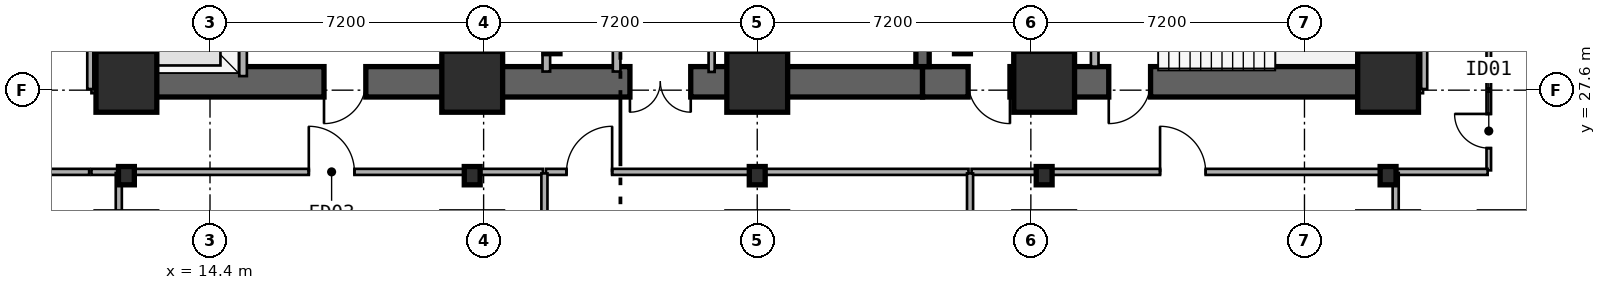
"""IFC4 building model, lengths in metres.
Left out: names, types, materials, properties, quantities, classifications, styles, units other than length and angle.
Written with IfcOpenShell. Run it as: python <this file> out.ifc"""

import sys

from ifc_helpers import new_model, si_unit, direction, frame, frame_2d, origin, origin_2d, place, context, subcontext, project, spatial, rectangle, i_section, extrude, element, fill, save


model = new_model("IFC4")
c1 = context("Model", 3, precision=1e-05, world=origin(), true_north=direction((0.0, 1.0)))
c2 = subcontext(c1, "Body", "Model", "MODEL_VIEW")
j1 = project(units=[si_unit("LENGTHUNIT", "METRE"), si_unit("PLANEANGLEUNIT", "RADIAN")], contexts=[c1])
p1 = place(None, origin())
s1 = spatial("IfcSite", under=j1, at=p1, CompositionType="ELEMENT")
p2 = place(p1, origin())
s2 = spatial("IfcBuilding", under=s1, at=p2, CompositionType="ELEMENT")
p3 = place(p2, frame((0.0, 0.0, -13.2)))
s3 = spatial("IfcBuildingStorey", under=s2, at=p3, CompositionType="ELEMENT", Elevation=-13.2)
p4 = place(p3, frame((21.18, 27.82, 0.0), z_axis=(0.0, 0.0, 1.0), x_axis=(-1.0, 0.0, 0.0)))
e1 = element("IfcWall", 1, at=p4, inside=s3, PredefinedType="SHEAR", context=c2, shape_type="SweptSolid", body=[
    extrude(rectangle(XDim=9.03, YDim=0.8, at=frame_2d((4.515, 0.0))), origin(), (0.0, 0.0, 1.0), 4.4),
])
p5 = place(p4, frame((2.68, 0.0, 0.0)))
e2 = element("IfcOpeningElement", 2, at=p5, cuts=e1, PredefinedType="OPENING", context=c2, shape_type="SweptSolid", body=[
    extrude(rectangle(XDim=1.1, YDim=2.15, at=frame_2d((0.55, 1.075))), frame((0.0, 0.41, 0.0), z_axis=(0.0, -1.0, 0.0), x_axis=(1.0, 0.0, 0.0)), (0.0, 0.0, 1.0), 0.82),
])
p6 = place(p3, frame((33.15, 27.82, 0.0), z_axis=(0.0, 0.0, 1.0), x_axis=(-1.0, 0.0, 0.0)))
e3 = element("IfcWall", 3, at=p6, inside=s3, PredefinedType="SHEAR", context=c2, shape_type="SweptSolid", body=[
    extrude(rectangle(XDim=11.97, YDim=0.8, at=frame_2d((5.985, 0.0))), origin(), (0.0, 0.0, 1.0), 4.4),
])
p7 = place(p6, frame((6.1, 0.0, 0.0)))
e4 = element("IfcOpeningElement", 4, at=p7, cuts=e3, PredefinedType="OPENING", context=c2, shape_type="SweptSolid", body=[
    extrude(rectangle(XDim=1.6, YDim=2.2, at=frame_2d((0.8, 1.1))), frame((0.0, 0.41, 0.0), z_axis=(0.0, -1.0, 0.0), x_axis=(1.0, 0.0, 0.0)), (0.0, 0.0, 1.0), 0.82),
])
p8 = place(p3, frame((45.38, 27.82, 0.0), z_axis=(0.0, 0.0, 1.0), x_axis=(-1.0, 0.0, 0.0)))
e5 = element("IfcWall", 5, at=p8, inside=s3, PredefinedType="SHEAR", context=c2, shape_type="SweptSolid", body=[
    extrude(rectangle(XDim=12.23, YDim=0.8, at=frame_2d((6.115, 0.0))), origin(), (0.0, 0.0, 1.0), 4.4),
])
p9 = place(p8, frame((9.93, 0.0, 0.0)))
e6 = element("IfcOpeningElement", 6, at=p9, cuts=e5, PredefinedType="OPENING", context=c2, shape_type="SweptSolid", body=[
    extrude(rectangle(XDim=1.1, YDim=2.15, at=frame_2d((0.55, 1.075))), frame((0.0, 0.41, 0.0), z_axis=(0.0, -1.0, 0.0), x_axis=(1.0, 0.0, 0.0)), (0.0, 0.0, 1.0), 0.82),
])
p10 = place(p8, frame((6.23, 0.0, 0.0)))
e7 = element("IfcOpeningElement", 7, at=p10, cuts=e5, PredefinedType="OPENING", context=c2, shape_type="SweptSolid", body=[
    extrude(rectangle(XDim=1.1, YDim=2.15, at=frame_2d((0.55, 1.075))), frame((0.0, 0.41, 0.0), z_axis=(0.0, -1.0, 0.0), x_axis=(1.0, 0.0, 0.0)), (0.0, 0.0, 1.0), 0.82),
])
for number, where, z_axis, x_axis in (
    (8, (12.15, 28.22, 0.0), (0.0, 0.0, 1.0), (0.0, 1.0, 0.0)),
    (9, (45.38, 28.22, 0.0), (0.0, 0.0, 1.0), (0.0, 1.0, 0.0)),
):
    element("IfcWall", number, at=place(p3, frame(where, z_axis=z_axis, x_axis=x_axis)), inside=s3, PredefinedType="SHEAR", context=c2, shape_type="SweptSolid", body=[
        extrude(rectangle(XDim=8.43, YDim=0.8, at=frame_2d((4.215, 0.0))), origin(), (0.0, 0.0, 1.0), 4.4),
    ])
for number, where, z_axis, x_axis in (
    (10, (21.18, 28.22, 0.0), (0.0, 0.0, 1.0), (0.0, 1.0, 0.0)),
    (11, (33.15, 28.22, 0.0), (0.0, 0.0, 1.0), (0.0, 1.0, 0.0)),
):
    element("IfcWall", number, at=place(p3, frame(where, z_axis=z_axis, x_axis=x_axis)), inside=s3, PredefinedType="SHEAR", context=c2, shape_type="SweptSolid", body=[
        extrude(rectangle(XDim=8.43, YDim=0.35, at=frame_2d((4.215, 0.0))), origin(), (0.0, 0.0, 1.0), 4.4),
    ])
p11 = place(p3, frame((36.38, 28.22, 0.0), z_axis=(0.0, 0.0, 1.0), x_axis=(0.0, 1.0, 0.0)))
e12 = element("IfcWall", 12, at=p11, inside=s3, PredefinedType="SHEAR", context=c2, shape_type="SweptSolid", body=[
    extrude(rectangle(XDim=8.43, YDim=0.35, at=frame_2d((4.215, 0.0))), origin(), (0.0, 0.0, 1.0), 4.4),
])
p12 = place(p11, frame((3.56, 0.0, 0.0)))
e13 = element("IfcOpeningElement", 13, at=p12, cuts=e12, PredefinedType="OPENING", context=c2, shape_type="SweptSolid", body=[
    extrude(rectangle(XDim=1.1, YDim=2.15, at=frame_2d((0.55, 1.075))), frame((0.0, 0.185, 0.0), z_axis=(0.0, -1.0, 0.0), x_axis=(1.0, 0.0, 0.0)), (0.0, 0.0, 1.0), 0.37),
])
for number, where, z_axis, x_axis in (
    (14, (23.4, 28.8, 0.0), (0.0, 0.0, 1.0), (1.0, 0.0, 0.0)),
    (15, (34.2, 28.8, 0.0), (0.0, 0.0, 1.0), (1.0, 0.0, 0.0)),
):
    element("IfcColumn", number, at=place(p3, frame(where, z_axis=z_axis, x_axis=x_axis)), inside=s3, PredefinedType="COLUMN", context=c2, shape_type="SweptSolid", body=[
        extrude(i_section(OverallWidth=0.418, OverallDepth=0.481, WebThickness=0.043, FlangeThickness=0.068, FilletRadius=0.015, at=origin_2d()), origin(), (0.0, 0.0, 1.0), 4.4),
    ])
for number, where, z_axis, x_axis in (
    (16, (12.2, 27.82, 0.0), (0.0, 0.0, 1.0), (1.0, 0.0, 0.0)),
    (17, (21.3, 27.82, 0.0), (0.0, 0.0, 1.0), (1.0, 0.0, 0.0)),
    (18, (28.8, 27.82, 0.0), (0.0, 0.0, 1.0), (1.0, 0.0, 0.0)),
    (19, (36.35, 27.82, 0.0), (0.0, 0.0, 1.0), (1.0, 0.0, 0.0)),
    (20, (45.4, 27.82, 0.0), (0.0, 0.0, 1.0), (1.0, 0.0, 0.0)),
):
    element("IfcColumn", number, at=place(p3, frame(where, z_axis=z_axis, x_axis=x_axis)), inside=s3, PredefinedType="COLUMN", context=c2, shape_type="SweptSolid", body=[
        extrude(rectangle(XDim=1.6, YDim=1.6, at=origin_2d()), origin(), (0.0, 0.0, 1.0), 4.4),
    ])
for number, where, z_axis, x_axis in (
    (21, (12.2, 25.35, 0.0), (0.0, 0.0, 1.0), (1.0, 0.0, 0.0)),
    (22, (21.3, 25.35, 0.0), (0.0, 0.0, 1.0), (1.0, 0.0, 0.0)),
    (23, (28.8, 25.35, 0.0), (0.0, 0.0, 1.0), (1.0, 0.0, 0.0)),
    (24, (36.35, 25.35, 0.0), (0.0, 0.0, 1.0), (1.0, 0.0, 0.0)),
    (25, (45.4, 25.35, 0.0), (0.0, 0.0, 1.0), (1.0, 0.0, 0.0)),
):
    element("IfcColumn", number, at=place(p3, frame(where, z_axis=z_axis, x_axis=x_axis)), inside=s3, PredefinedType="COLUMN", context=c2, shape_type="SweptSolid", body=[
        extrude(i_section(OverallWidth=0.418, OverallDepth=0.481, WebThickness=0.043, FlangeThickness=0.068, FilletRadius=0.015, at=origin_2d()), origin(), (0.0, 0.0, 1.0), 4.4),
    ])
p13 = place(p3, frame((15.27, 27.97, 0.0), z_axis=(0.0, 0.0, 1.0), x_axis=(0.0, 1.0, 0.0)))
e26 = element("IfcWall", 26, at=p13, inside=s3, PredefinedType="PARTITIONING", context=c2, shape_type="SweptSolid", body=[
    extrude(rectangle(XDim=2.96, YDim=0.2, at=frame_2d((1.48, 0.0))), origin(), (0.0, 0.0, 1.0), 3.052),
])
p14 = place(p13, frame((0.93, 0.0, 0.0)))
e27 = element("IfcOpeningElement", 27, at=p14, cuts=e26, PredefinedType="OPENING", context=c2, shape_type="SweptSolid", body=[
    extrude(rectangle(XDim=1.1, YDim=2.15, at=frame_2d((0.55, 1.075))), frame((0.0, 0.11, 0.0), z_axis=(0.0, -1.0, 0.0), x_axis=(1.0, 0.0, 0.0)), (0.0, 0.0, 1.0), 0.22),
])
p15 = place(p3, frame((37.68, 28.22, 0.0), z_axis=(0.0, 0.0, 1.0), x_axis=(0.0, 1.0, 0.0)))
e28 = element("IfcWall", 28, at=p15, inside=s3, PredefinedType="PARTITIONING", context=c2, shape_type="SweptSolid", body=[
    extrude(rectangle(XDim=3.03, YDim=0.2, at=frame_2d((1.515, 0.0))), origin(), (0.0, 0.0, 1.0), 4.08),
])
p16 = place(p3, frame((25.1, 28.09, 0.0), z_axis=(0.0, 0.0, 1.0), x_axis=(0.0, 1.0, 0.0)))
e29 = element("IfcWall", 29, at=p16, inside=s3, PredefinedType="PARTITIONING", context=c2, shape_type="SweptSolid", body=[
    extrude(rectangle(XDim=4.12, YDim=0.2, at=frame_2d((2.06, 0.0))), origin(), (0.0, 0.0, 1.0), 4.08),
])
p17 = place(p16, frame((1.46, 0.0, 0.0)))
e30 = element("IfcOpeningElement", 30, at=p17, cuts=e29, PredefinedType="OPENING", context=c2, shape_type="SweptSolid", body=[
    extrude(rectangle(XDim=1.2, YDim=2.15, at=frame_2d((0.6, 1.075))), frame((0.0, 0.11, 0.0), z_axis=(0.0, -1.0, 0.0), x_axis=(1.0, 0.0, 0.0)), (0.0, 0.0, 1.0), 0.22),
])
p18 = place(p3, frame((23.25, 28.09, 0.0), z_axis=(0.0, 0.0, 1.0), x_axis=(0.0, 1.0, 0.0)))
e31 = element("IfcWall", 31, at=p18, inside=s3, PredefinedType="PARTITIONING", context=c2, shape_type="SweptSolid", body=[
    extrude(rectangle(XDim=4.12, YDim=0.2, at=frame_2d((2.06, 0.0))), origin(), (0.0, 0.0, 1.0), 4.08),
])
p19 = place(p3, frame((48.05, 25.49, 0.0), z_axis=(0.0, 0.0, 1.0), x_axis=(0.0, 1.0, 0.0)))
e32 = element("IfcWall", 32, at=p19, inside=s3, PredefinedType="PARTITIONING", context=c2, shape_type="SweptSolid", body=[
    extrude(rectangle(XDim=2.07, YDim=0.12, at=frame_2d((1.035, 0.0))), origin(), (0.0, 0.0, 1.0), 4.08),
])
p20 = place(p19, frame((0.585, 0.0, 0.0)))
e33 = element("IfcOpeningElement", 33, at=p20, cuts=e32, PredefinedType="OPENING", context=c2, shape_type="SweptSolid", body=[
    extrude(rectangle(XDim=0.9, YDim=2.1, at=frame_2d((0.45, 1.05))), frame((0.0, 0.07, 0.0), z_axis=(0.0, -1.0, 0.0), x_axis=(1.0, 0.0, 0.0)), (0.0, 0.0, 1.0), 0.14),
])
p21 = place(p3, frame((12.04, 25.45, 0.0), z_axis=(0.0, 0.0, 1.0), x_axis=(1.0, 0.0, 0.0)))
e34 = element("IfcWall", 34, at=p21, inside=s3, PredefinedType="PARTITIONING", context=c2, shape_type="SweptSolid", body=[
    extrude(rectangle(XDim=11.12, YDim=0.16, at=frame_2d((5.56, 0.0))), origin(), (0.0, 0.0, 1.0), 3.246),
])
p22 = place(p21, frame((4.96, 0.0, 0.0)))
e35 = element("IfcOpeningElement", 35, at=p22, cuts=e34, PredefinedType="OPENING", context=c2, shape_type="SweptSolid", body=[
    extrude(rectangle(XDim=1.2, YDim=2.15, at=frame_2d((0.6, 1.075))), frame((0.0, 0.09, 0.0), z_axis=(0.0, -1.0, 0.0), x_axis=(1.0, 0.0, 0.0)), (0.0, 0.0, 1.0), 0.18),
])
p23 = place(p3, frame((23.24, 25.45, 0.0), z_axis=(0.0, 0.0, 1.0), x_axis=(1.0, 0.0, 0.0)))
e36 = element("IfcWall", 36, at=p23, inside=s3, PredefinedType="PARTITIONING", context=c2, shape_type="SweptSolid", body=[
    extrude(rectangle(XDim=11.12, YDim=0.16, at=frame_2d((5.56, 0.0))), origin(), (0.0, 0.0, 1.0), 4.08),
])
p24 = place(p23, frame((0.542, 0.0, 0.0)))
e37 = element("IfcOpeningElement", 37, at=p24, cuts=e36, PredefinedType="OPENING", context=c2, shape_type="SweptSolid", body=[
    extrude(rectangle(XDim=1.2, YDim=2.15, at=frame_2d((0.6, 1.075))), frame((0.0, 0.09, 0.0), z_axis=(0.0, -1.0, 0.0), x_axis=(1.0, 0.0, 0.0)), (0.0, 0.0, 1.0), 0.18),
])
p25 = place(p3, frame((34.44, 25.45, 0.0), z_axis=(0.0, 0.0, 1.0), x_axis=(1.0, 0.0, 0.0)))
e38 = element("IfcWall", 38, at=p25, inside=s3, PredefinedType="PARTITIONING", context=c2, shape_type="SweptSolid", body=[
    extrude(rectangle(XDim=11.12, YDim=0.16, at=frame_2d((5.56, 0.0))), origin(), (0.0, 0.0, 1.0), 3.246),
])
p26 = place(p25, frame((4.96, 0.0, 0.0)))
e39 = element("IfcOpeningElement", 39, at=p26, cuts=e38, PredefinedType="OPENING", context=c2, shape_type="SweptSolid", body=[
    extrude(rectangle(XDim=1.2, YDim=2.15, at=frame_2d((0.6, 1.075))), frame((0.0, 0.09, 0.0), z_axis=(0.0, -1.0, 0.0), x_axis=(1.0, 0.0, 0.0)), (0.0, 0.0, 1.0), 0.18),
])
p27 = place(p3, frame((48.05, 27.64, 0.0), z_axis=(0.0, 0.0, 1.0), x_axis=(0.0, 1.0, 0.0)))
e40 = element("IfcWall", 40, at=p27, inside=s3, PredefinedType="PARTITIONING", context=c2, shape_type="SweptSolid", body=[
    extrude(rectangle(XDim=10.27, YDim=0.12, at=frame_2d((5.135, 0.0))), origin(), (0.0, 0.0, 1.0), 4.08),
])
p28 = place(p27, frame((4.685, 0.0, 0.0)))
e41 = element("IfcOpeningElement", 41, at=p28, cuts=e40, PredefinedType="OPENING", context=c2, shape_type="SweptSolid", body=[
    extrude(rectangle(XDim=0.9, YDim=2.1, at=frame_2d((0.45, 1.05))), frame((0.0, 0.07, 0.0), z_axis=(0.0, -1.0, 0.0), x_axis=(1.0, 0.0, 0.0)), (0.0, 0.0, 1.0), 0.14),
])
for number, where, z_axis, x_axis in (
    (42, (23.2, 18.04, 0.0), (0.0, 0.0, 1.0), (0.0, 1.0, 0.0)),
    (43, (34.4, 18.04, 0.0), (0.0, 0.0, 1.0), (0.0, 1.0, 0.0)),
):
    element("IfcWall", number, at=place(p3, frame(where, z_axis=z_axis, x_axis=x_axis)), inside=s3, PredefinedType="PARTITIONING", context=c2, shape_type="SweptSolid", body=[
        extrude(rectangle(XDim=7.37, YDim=0.16, at=frame_2d((3.685, 0.0))), origin(), (0.0, 0.0, 1.0), 2.66),
    ])
p29 = place(p3, frame((27.6, 28.08, 0.0), z_axis=(0.0, 0.0, 1.0), x_axis=(0.0, 1.0, 0.0)))
e44 = element("IfcWall", 44, at=p29, inside=s3, PredefinedType="PARTITIONING", context=c2, shape_type="SweptSolid", body=[
    extrude(rectangle(XDim=2.64, YDim=0.16, at=frame_2d((1.32, 0.0))), origin(), (0.0, 0.0, 1.0), 4.08),
])
p30 = place(p3, frame((11.28, 25.45, 0.0), z_axis=(0.0, 0.0, 1.0), x_axis=(1.0, 0.0, 0.0)))
e45 = element("IfcWall", 45, at=p30, inside=s3, PredefinedType="PARTITIONING", context=c2, shape_type="SweptSolid", body=[
    extrude(rectangle(XDim=0.69, YDim=0.16, at=frame_2d((0.345, 0.0))), origin(), (0.0, 0.0, 1.0), 3.246),
])
p31 = place(p3, frame((45.63, 25.45, 0.0), z_axis=(0.0, 0.0, 1.0), x_axis=(1.0, 0.0, 0.0)))
e46 = element("IfcWall", 46, at=p31, inside=s3, PredefinedType="PARTITIONING", context=c2, shape_type="SweptSolid", body=[
    extrude(rectangle(XDim=2.39, YDim=0.16, at=frame_2d((1.195, 0.0))), origin(), (0.0, 0.0, 1.0), 3.246),
])
p32 = place(p3, frame((11.28, 27.6, 0.0), z_axis=(0.0, 0.0, 1.0), x_axis=(1.0, 0.0, 0.0)))
e47 = element("IfcWall", 47, at=p32, inside=s3, PredefinedType="PARTITIONING", context=c2, shape_type="SweptSolid", body=[
    extrude(rectangle(XDim=0.84, YDim=0.16, at=frame_2d((0.42, 0.0))), origin(), (0.0, 0.0, 1.0), 3.052),
])
p33 = place(p3, frame((45.41, 27.6, 0.0), z_axis=(0.0, 0.0, 1.0), x_axis=(1.0, 0.0, 0.0)))
e48 = element("IfcWall", 48, at=p33, inside=s3, PredefinedType="PARTITIONING", context=c2, shape_type="SweptSolid", body=[
    extrude(rectangle(XDim=0.91, YDim=0.16, at=frame_2d((0.455, 0.0))), origin(), (0.0, 0.0, 1.0), 3.052),
])
p34 = place(p3, frame((46.35, 27.63, 0.0), z_axis=(0.0, 0.0, 1.0), x_axis=(0.0, 1.0, 0.0)))
e49 = element("IfcWall", 49, at=p34, inside=s3, PredefinedType="PARTITIONING", context=c2, shape_type="SweptSolid", body=[
    extrude(rectangle(XDim=10.29, YDim=0.16, at=frame_2d((5.145, 0.0))), origin(), (0.0, 0.0, 1.0), 4.08),
])
p35 = place(p3, frame((1.83, 25.45, 0.0), z_axis=(0.0, 0.0, 1.0), x_axis=(1.0, 0.0, 0.0)))
e50 = element("IfcWall", 50, at=p35, inside=s3, PredefinedType="PARTITIONING", context=c2, shape_type="SweptSolid", body=[
    extrude(rectangle(XDim=9.39, YDim=0.16, at=frame_2d((4.695, 0.0))), origin(), (0.0, 0.0, 1.0), 4.08),
])
p36 = place(p3, frame((11.25, 27.63, 0.0), z_axis=(0.0, 0.0, 1.0), x_axis=(0.0, 1.0, 0.0)))
e51 = element("IfcWall", 51, at=p36, inside=s3, PredefinedType="PARTITIONING", context=c2, shape_type="SweptSolid", body=[
    extrude(rectangle(XDim=10.29, YDim=0.16, at=frame_2d((5.145, 0.0))), origin(), (0.0, 0.0, 1.0), 4.08),
])
for number, where, z_axis, x_axis in (
    (52, (12.0, 18.03, 0.0), (0.0, 0.0, 1.0), (0.0, 1.0, 0.0)),
    (53, (45.6, 18.03, 0.0), (0.0, 0.0, 1.0), (0.0, 1.0, 0.0)),
):
    element("IfcWall", number, at=place(p3, frame(where, z_axis=z_axis, x_axis=x_axis)), inside=s3, PredefinedType="PARTITIONING", context=c2, shape_type="SweptSolid", body=[
        extrude(rectangle(XDim=7.39, YDim=0.16, at=frame_2d((3.695, 0.0))), origin(), (0.0, 0.0, 1.0), 2.66),
    ])
p37 = place(p5, origin())
e54 = element("IfcDoor", 54, at=p37, inside=s3, OperationType="SINGLE_SWING_RIGHT", PredefinedType="DOOR", context=c2, shape_type="SweptSolid", body=[
    extrude(rectangle(XDim=1.1, YDim=2.15, at=frame_2d((0.55, 1.075))), frame((0.0, 0.025, 0.0), z_axis=(0.0, -1.0, 0.0), x_axis=(1.0, 0.0, 0.0)), (0.0, 0.0, 1.0), 0.05),
])
fill(e2, e54)
p38 = place(p9, origin())
e55 = element("IfcDoor", 55, at=p38, inside=s3, OperationType="SINGLE_SWING_LEFT", PredefinedType="DOOR", context=c2, shape_type="SweptSolid", body=[
    extrude(rectangle(XDim=1.1, YDim=2.15, at=frame_2d((0.55, 1.075))), frame((0.0, 0.025, 0.0), z_axis=(0.0, -1.0, 0.0), x_axis=(1.0, 0.0, 0.0)), (0.0, 0.0, 1.0), 0.05),
])
fill(e6, e55)
p39 = place(p10, origin())
e56 = element("IfcDoor", 56, at=p39, inside=s3, OperationType="SINGLE_SWING_RIGHT", PredefinedType="DOOR", context=c2, shape_type="SweptSolid", body=[
    extrude(rectangle(XDim=1.1, YDim=2.15, at=frame_2d((0.55, 1.075))), frame((0.0, 0.025, 0.0), z_axis=(0.0, -1.0, 0.0), x_axis=(1.0, 0.0, 0.0)), (0.0, 0.0, 1.0), 0.05),
])
fill(e7, e56)
p40 = place(p7, origin())
e57 = element("IfcDoor", 57, at=p40, inside=s3, OperationType="SINGLE_SWING_LEFT", PredefinedType="DOOR", context=c2, shape_type="SweptSolid", body=[
    extrude(rectangle(XDim=1.6, YDim=2.2, at=frame_2d((0.8, 1.1))), frame((0.0, 0.025, 0.0), z_axis=(0.0, -1.0, 0.0), x_axis=(1.0, 0.0, 0.0)), (0.0, 0.0, 1.0), 0.05),
])
fill(e4, e57)
p41 = place(p20, origin())
e58 = element("IfcDoor", 58, at=p41, inside=s3, OperationType="SINGLE_SWING_RIGHT", PredefinedType="DOOR", context=c2, shape_type="SweptSolid", body=[
    extrude(rectangle(XDim=0.9, YDim=2.1, at=frame_2d((0.45, 1.05))), frame((0.0, 0.025, 0.0), z_axis=(0.0, -1.0, 0.0), x_axis=(1.0, 0.0, 0.0)), (0.0, 0.0, 1.0), 0.05),
])
fill(e33, e58)
p42 = place(p22, origin())
e59 = element("IfcDoor", 59, at=p42, inside=s3, OperationType="SINGLE_SWING_LEFT", PredefinedType="DOOR", context=c2, shape_type="SweptSolid", body=[
    extrude(rectangle(XDim=1.2, YDim=2.15, at=frame_2d((0.6, 1.075))), frame((0.0, 0.025, 0.0), z_axis=(0.0, -1.0, 0.0), x_axis=(1.0, 0.0, 0.0)), (0.0, 0.0, 1.0), 0.05),
])
fill(e35, e59)
p43 = place(p24, origin())
e60 = element("IfcDoor", 60, at=p43, inside=s3, OperationType="SINGLE_SWING_RIGHT", PredefinedType="DOOR", context=c2, shape_type="SweptSolid", body=[
    extrude(rectangle(XDim=1.2, YDim=2.15, at=frame_2d((0.6, 1.075))), frame((0.0, 0.025, 0.0), z_axis=(0.0, -1.0, 0.0), x_axis=(1.0, 0.0, 0.0)), (0.0, 0.0, 1.0), 0.05),
])
fill(e37, e60)
p44 = place(p26, origin())
e61 = element("IfcDoor", 61, at=p44, inside=s3, OperationType="SINGLE_SWING_LEFT", PredefinedType="DOOR", context=c2, shape_type="SweptSolid", body=[
    extrude(rectangle(XDim=1.2, YDim=2.15, at=frame_2d((0.6, 1.075))), frame((0.0, 0.025, 0.0), z_axis=(0.0, -1.0, 0.0), x_axis=(1.0, 0.0, 0.0)), (0.0, 0.0, 1.0), 0.05),
])
fill(e39, e61)
save(model, sys.argv[1])
